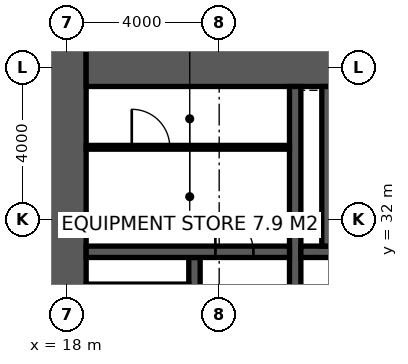
"""IFC4 building model, lengths in metres.
Left out: names, types, materials, properties, quantities, classifications, styles, units other than length and angle.
Written with IfcOpenShell. Run it as: python <this file> out.ifc"""

import sys

from ifc_helpers import new_model, si_unit, direction, frame, frame_2d, origin, place, context, subcontext, project, spatial, rectangle, extrude, element, fill, save


model = new_model("IFC4")
c1 = context("Model", 3, precision=1e-05, world=origin(), true_north=direction((0.0, 1.0)))
c2 = subcontext(c1, "Body", "Model", "MODEL_VIEW")
j1 = project(units=[si_unit("LENGTHUNIT", "METRE"), si_unit("PLANEANGLEUNIT", "RADIAN")], contexts=[c1])
p1 = place(None, origin())
s1 = spatial("IfcSite", under=j1, at=p1, CompositionType="ELEMENT")
p2 = place(p1, origin())
s2 = spatial("IfcBuilding", under=s1, at=p2, CompositionType="ELEMENT")
p3 = place(p2, frame((0.0, 0.0, 27.0)))
s3 = spatial("IfcBuildingStorey", under=s2, at=p3, CompositionType="ELEMENT", Elevation=27.0)
p4 = place(p3, frame((18.0, 17.1, -0.15), z_axis=(0.0, 0.0, 1.0), x_axis=(0.0, 1.0, 0.0)))
e1 = element("IfcWall", 1, at=p4, inside=s3, PredefinedType="SHEAR", context=c2, shape_type="SweptSolid", body=[
    extrude(rectangle(XDim=19.8, YDim=1.0, at=frame_2d((9.9, 0.0))), origin(), (0.0, 0.0, 1.0), 4.0),
])
p5 = place(p3, frame((18.5, 36.2, -0.15), z_axis=(0.0, 0.0, 1.0), x_axis=(1.0, 0.0, 0.0)))
e2 = element("IfcWall", 2, at=p5, inside=s3, PredefinedType="SHEAR", context=c2, shape_type="SweptSolid", body=[
    extrude(rectangle(XDim=23.0, YDim=1.4, at=frame_2d((11.5, 0.0))), origin(), (0.0, 0.0, 1.0), 4.0),
])
p6 = place(p3, frame((24.0, 18.5, -0.15), z_axis=(0.0, 0.0, 1.0), x_axis=(0.0, 1.0, 0.0)))
e3 = element("IfcWall", 3, at=p6, inside=s3, PredefinedType="SHEAR", context=c2, shape_type="SweptSolid", body=[
    extrude(rectangle(XDim=17.0, YDim=0.3, at=frame_2d((8.5, 0.0))), origin(), (0.0, 0.0, 1.0), 4.0),
])
p7 = place(p6, frame((9.6, 0.0, 0.15)))
e4 = element("IfcOpeningElement", 4, at=p7, cuts=e3, PredefinedType="OPENING", context=c2, shape_type="SweptSolid", body=[
    extrude(rectangle(XDim=1.5, YDim=2.4, at=frame_2d((0.75, 1.2))), frame((0.0, 0.16, 0.0), z_axis=(0.0, -1.0, 0.0), x_axis=(1.0, 0.0, 0.0)), (0.0, 0.0, 1.0), 0.32),
])
p8 = place(p3, frame((24.15, 31.15, -0.15), z_axis=(0.0, 0.0, 1.0), x_axis=(1.0, 0.0, 0.0)))
e5 = element("IfcWall", 5, at=p8, inside=s3, PredefinedType="SHEAR", context=c2, shape_type="SweptSolid", body=[
    extrude(rectangle(XDim=11.25, YDim=0.3, at=frame_2d((5.625, 0.0))), origin(), (0.0, 0.0, 1.0), 4.0),
])
p9 = place(p8, frame((7.25, 0.0, 0.15)))
e6 = element("IfcOpeningElement", 6, at=p9, cuts=e5, PredefinedType="OPENING", context=c2, shape_type="SweptSolid", body=[
    extrude(rectangle(XDim=1.4, YDim=2.4, at=frame_2d((0.7, 1.2))), frame((0.0, 0.16, 0.0), z_axis=(0.0, -1.0, 0.0), x_axis=(1.0, 0.0, 0.0)), (0.0, 0.0, 1.0), 0.32),
])
p10 = place(p3, frame((21.35, 18.5, -0.15), z_axis=(0.0, 0.0, 1.0), x_axis=(0.0, 1.0, 0.0)))
e7 = element("IfcWall", 7, at=p10, inside=s3, PredefinedType="SHEAR", context=c2, shape_type="SweptSolid", body=[
    extrude(rectangle(XDim=12.5, YDim=0.3, at=frame_2d((6.25, 0.0))), origin(), (0.0, 0.0, 1.0), 4.0),
])
p11 = place(p10, frame((8.15, 0.0, 0.15)))
e8 = element("IfcOpeningElement", 8, at=p11, cuts=e7, PredefinedType="OPENING", context=c2, shape_type="SweptSolid", body=[
    extrude(rectangle(XDim=1.0, YDim=2.2, at=frame_2d((0.5, 1.1))), frame((0.0, 0.16, 0.0), z_axis=(0.0, -1.0, 0.0), x_axis=(1.0, 0.0, 0.0)), (0.0, 0.0, 1.0), 0.32),
])
p12 = place(p3, frame((18.5, 31.15, -0.15), z_axis=(0.0, 0.0, 1.0), x_axis=(1.0, 0.0, 0.0)))
e9 = element("IfcWall", 9, at=p12, inside=s3, PredefinedType="SHEAR", context=c2, shape_type="SweptSolid", body=[
    extrude(rectangle(XDim=5.35, YDim=0.3, at=frame_2d((2.675, 0.0))), origin(), (0.0, 0.0, 1.0), 4.0),
])
p13 = place(p12, frame((3.4, 0.0, 0.15)))
e10 = element("IfcOpeningElement", 10, at=p13, cuts=e9, PredefinedType="OPENING", context=c2, shape_type="SweptSolid", body=[
    extrude(rectangle(XDim=1.0, YDim=2.2, at=frame_2d((0.5, 1.1))), frame((0.0, 0.16, 0.0), z_axis=(0.0, -1.0, 0.0), x_axis=(1.0, 0.0, 0.0)), (0.0, 0.0, 1.0), 0.32),
])
p14 = place(p3, frame((24.85, 31.3, -0.15), z_axis=(0.0, 0.0, 1.0), x_axis=(0.0, 1.0, 0.0)))
e11 = element("IfcWall", 11, at=p14, inside=s3, PredefinedType="SHEAR", context=c2, shape_type="SweptSolid", body=[
    extrude(rectangle(XDim=4.2, YDim=0.3, at=frame_2d((2.1, 0.0))), origin(), (0.0, 0.0, 1.0), 4.0),
])
p15 = place(p3, frame((18.5, 33.9, 0.0), z_axis=(0.0, 0.0, 1.0), x_axis=(1.0, 0.0, 0.0)))
e12 = element("IfcWall", 12, at=p15, inside=s3, PredefinedType="PARTITIONING", context=c2, shape_type="SweptSolid", body=[
    extrude(rectangle(XDim=5.35, YDim=0.1, at=frame_2d((2.675, 0.0))), origin(), (0.0, 0.0, 1.0), 3.85),
])
p16 = place(p15, frame((1.2, 0.0, 0.0)))
e13 = element("IfcOpeningElement", 13, at=p16, cuts=e12, PredefinedType="OPENING", context=c2, shape_type="SweptSolid", body=[
    extrude(rectangle(XDim=1.0, YDim=2.2, at=frame_2d((0.5, 1.1))), frame((0.0, 0.06, 0.0), z_axis=(0.0, -1.0, 0.0), x_axis=(1.0, 0.0, 0.0)), (0.0, 0.0, 1.0), 0.12),
])
p17 = place(p13, origin())
e14 = element("IfcDoor", 14, at=p17, inside=s3, OperationType="SINGLE_SWING_LEFT", PredefinedType="DOOR", context=c2, shape_type="SweptSolid", body=[
    extrude(rectangle(XDim=1.0, YDim=2.2, at=frame_2d((0.5, 1.1))), frame((0.0, 0.025, 0.0), z_axis=(0.0, -1.0, 0.0), x_axis=(1.0, 0.0, 0.0)), (0.0, 0.0, 1.0), 0.05),
])
fill(e10, e14)
p18 = place(p16, origin())
e15 = element("IfcDoor", 15, at=p18, inside=s3, OperationType="SINGLE_SWING_LEFT", PredefinedType="DOOR", context=c2, shape_type="SweptSolid", body=[
    extrude(rectangle(XDim=1.0, YDim=2.2, at=frame_2d((0.5, 1.1))), frame((0.0, 0.025, 0.0), z_axis=(0.0, -1.0, 0.0), x_axis=(1.0, 0.0, 0.0)), (0.0, 0.0, 1.0), 0.05),
])
fill(e13, e15)
save(model, sys.argv[1])
